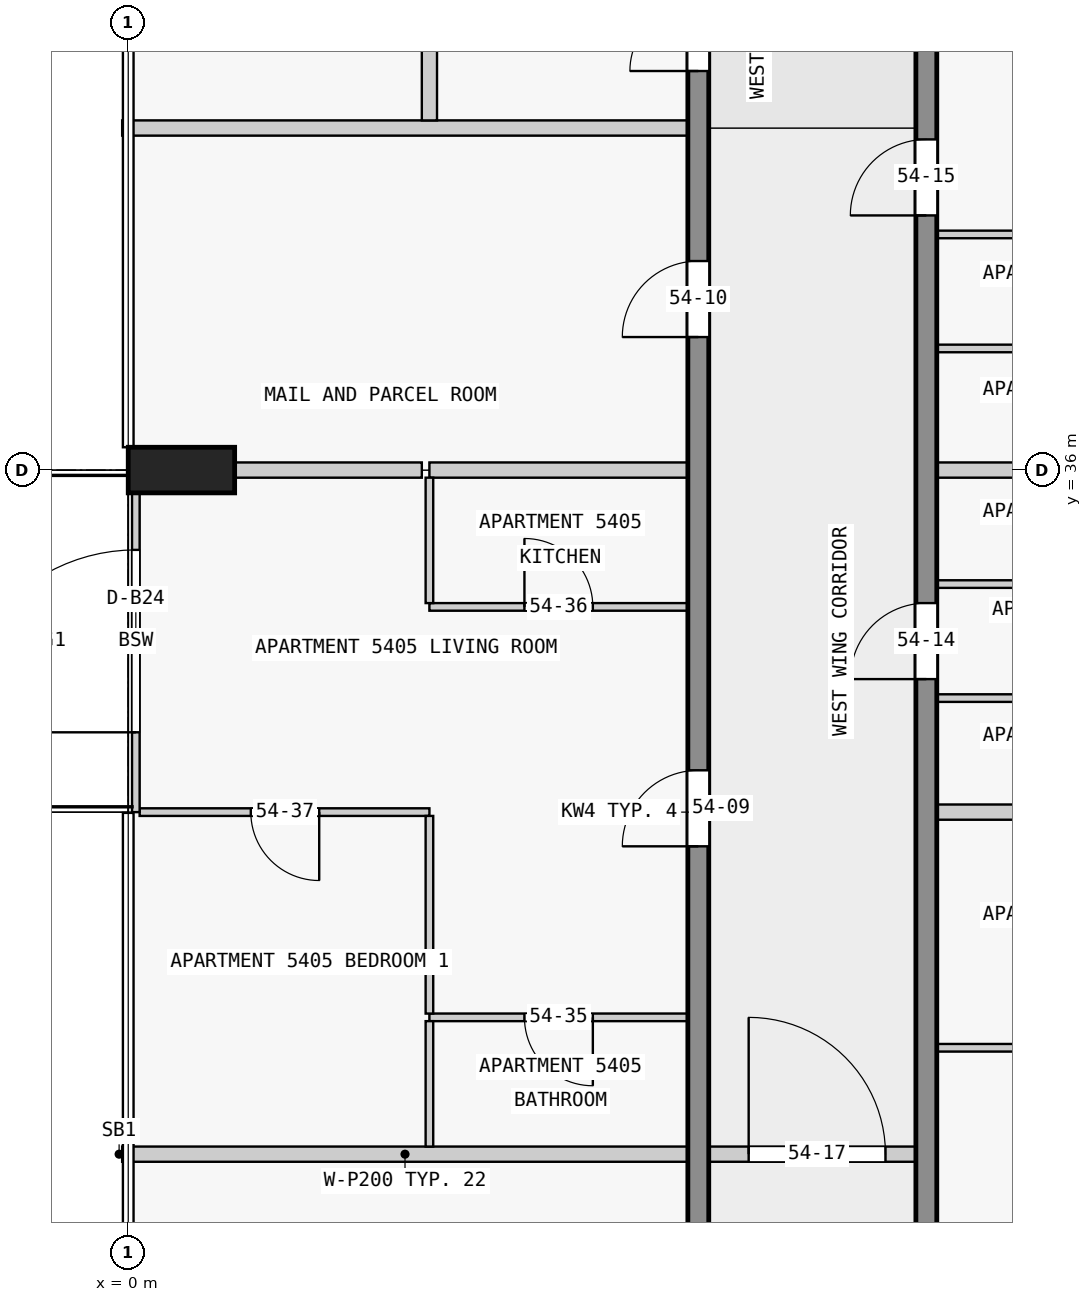
"""IFC4 building model, lengths in metres.
Left out: names, types, materials, properties, quantities, classifications, styles, units other than length and angle.
Written with IfcOpenShell. Run it as: python <this file> out.ifc"""

import sys

from ifc_helpers import new_model, si_unit, direction, frame, frame_2d, origin, origin_2d, place, context, subcontext, project, spatial, rectangle, extrude, element, fill, save


model = new_model("IFC4")
c1 = context("Model", 3, precision=1e-05, world=origin(), true_north=direction((0.0, 1.0)))
c2 = subcontext(c1, "Body", "Model", "MODEL_VIEW")
j1 = project(units=[si_unit("LENGTHUNIT", "METRE"), si_unit("PLANEANGLEUNIT", "RADIAN")], contexts=[c1])
p1 = place(None, origin())
s1 = spatial("IfcSite", under=j1, at=p1, CompositionType="ELEMENT")
p2 = place(p1, origin())
s2 = spatial("IfcBuilding", under=s1, at=p2, CompositionType="ELEMENT")
p3 = place(p2, frame((0.0, 0.0, 208.4)))
s3 = spatial("IfcBuildingStorey", under=s2, at=p3, CompositionType="ELEMENT", Elevation=208.4)
p4 = place(p3, frame((0.7, 36.0, 0.0), z_axis=(0.0, 0.0, 1.0), x_axis=(0.0, 1.0, 0.0)))
e1 = element("IfcColumn", 1, at=p4, inside=s3, PredefinedType="COLUMN", context=c2, shape_type="SweptSolid", body=[
    extrude(rectangle(XDim=0.6, YDim=1.4, at=origin_2d()), origin(), (0.0, 0.0, 1.0), 3.5),
])
p5 = place(p3, frame((7.5, 18.0, 0.0), z_axis=(0.0, 0.0, 1.0), x_axis=(0.0, 1.0, 0.0)))
e2 = element("IfcWall", 2, at=p5, inside=s3, PredefinedType="SHEAR", context=c2, shape_type="SweptSolid", body=[
    extrude(rectangle(XDim=27.0, YDim=0.275, at=frame_2d((13.5, 0.0))), origin(), (0.0, 0.0, 1.0), 3.25),
])
p6 = place(p5, frame((1.75, 0.0, 0.0)))
e3 = element("IfcOpeningElement", 3, at=p6, cuts=e2, PredefinedType="OPENING", context=c2, shape_type="SweptSolid", body=[
    extrude(rectangle(XDim=1.0, YDim=2.1, at=frame_2d((0.5, 1.05))), frame((0.0, 0.147, 0.0), z_axis=(0.0, -1.0, 0.0), x_axis=(1.0, 0.0, 0.0)), (0.0, 0.0, 1.0), 0.295),
])
p7 = place(p5, frame((5.85, 0.0, 0.0)))
e4 = element("IfcOpeningElement", 4, at=p7, cuts=e2, PredefinedType="OPENING", context=c2, shape_type="SweptSolid", body=[
    extrude(rectangle(XDim=1.8, YDim=2.1, at=frame_2d((0.9, 1.05))), frame((0.0, 0.147, 0.0), z_axis=(0.0, -1.0, 0.0), x_axis=(1.0, 0.0, 0.0)), (0.0, 0.0, 1.0), 0.295),
])
p8 = place(p5, frame((13.05, 0.0, 0.0)))
e5 = element("IfcOpeningElement", 5, at=p8, cuts=e2, PredefinedType="OPENING", context=c2, shape_type="SweptSolid", body=[
    extrude(rectangle(XDim=1.0, YDim=2.1, at=frame_2d((0.5, 1.05))), frame((0.0, 0.147, 0.0), z_axis=(0.0, -1.0, 0.0), x_axis=(1.0, 0.0, 0.0)), (0.0, 0.0, 1.0), 0.295),
])
p9 = place(p5, frame((19.75, 0.0, 0.0)))
e6 = element("IfcOpeningElement", 6, at=p9, cuts=e2, PredefinedType="OPENING", context=c2, shape_type="SweptSolid", body=[
    extrude(rectangle(XDim=1.0, YDim=2.1, at=frame_2d((0.5, 1.05))), frame((0.0, 0.147, 0.0), z_axis=(0.0, -1.0, 0.0), x_axis=(1.0, 0.0, 0.0)), (0.0, 0.0, 1.0), 0.295),
])
p10 = place(p5, frame((23.25, 0.0, 0.0)))
e7 = element("IfcOpeningElement", 7, at=p10, cuts=e2, PredefinedType="OPENING", context=c2, shape_type="SweptSolid", body=[
    extrude(rectangle(XDim=0.9, YDim=2.1, at=frame_2d((0.45, 1.05))), frame((0.0, 0.147, 0.0), z_axis=(0.0, -1.0, 0.0), x_axis=(1.0, 0.0, 0.0)), (0.0, 0.0, 1.0), 0.295),
])
p11 = place(p5, frame((25.45, 0.0, 0.0)))
e8 = element("IfcOpeningElement", 8, at=p11, cuts=e2, PredefinedType="OPENING", context=c2, shape_type="SweptSolid", body=[
    extrude(rectangle(XDim=1.0, YDim=2.1, at=frame_2d((0.5, 1.05))), frame((0.0, 0.147, 0.0), z_axis=(0.0, -1.0, 0.0), x_axis=(1.0, 0.0, 0.0)), (0.0, 0.0, 1.0), 0.295),
])
p12 = place(p3, frame((10.5, 18.0, 0.0), z_axis=(0.0, 0.0, 1.0), x_axis=(0.0, 1.0, 0.0)))
e9 = element("IfcWall", 9, at=p12, inside=s3, PredefinedType="SHEAR", context=c2, shape_type="SweptSolid", body=[
    extrude(rectangle(XDim=27.0, YDim=0.275, at=frame_2d((13.5, 0.0))), origin(), (0.0, 0.0, 1.0), 3.25),
])
p13 = place(p12, frame((4.85, 0.0, 0.0)))
e10 = element("IfcOpeningElement", 10, at=p13, cuts=e9, PredefinedType="OPENING", context=c2, shape_type="SweptSolid", body=[
    extrude(rectangle(XDim=1.0, YDim=2.1, at=frame_2d((0.5, 1.05))), frame((0.0, 0.147, 0.0), z_axis=(0.0, -1.0, 0.0), x_axis=(1.0, 0.0, 0.0)), (0.0, 0.0, 1.0), 0.295),
])
p14 = place(p12, frame((15.25, 0.0, 0.0)))
e11 = element("IfcOpeningElement", 11, at=p14, cuts=e9, PredefinedType="OPENING", context=c2, shape_type="SweptSolid", body=[
    extrude(rectangle(XDim=1.0, YDim=2.1, at=frame_2d((0.5, 1.05))), frame((0.0, 0.147, 0.0), z_axis=(0.0, -1.0, 0.0), x_axis=(1.0, 0.0, 0.0)), (0.0, 0.0, 1.0), 0.295),
])
p15 = place(p12, frame((21.35, 0.0, 0.0)))
e12 = element("IfcOpeningElement", 12, at=p15, cuts=e9, PredefinedType="OPENING", context=c2, shape_type="SweptSolid", body=[
    extrude(rectangle(XDim=1.0, YDim=2.1, at=frame_2d((0.5, 1.05))), frame((0.0, 0.147, 0.0), z_axis=(0.0, -1.0, 0.0), x_axis=(1.0, 0.0, 0.0)), (0.0, 0.0, 1.0), 0.295),
])
p16 = place(p3, frame((0.1, 31.5, 0.0), z_axis=(0.0, 0.0, 1.0), x_axis=(0.0, 1.0, 0.0)))
e13 = element("IfcWall", 13, at=p16, inside=s3, PredefinedType="STANDARD", context=c2, shape_type="SweptSolid", body=[
    extrude(rectangle(XDim=4.5, YDim=0.1, at=frame_2d((2.25, 0.0))), origin(), (0.0, 0.0, 1.0), 3.25),
])
p17 = place(p16, frame((1.05, 0.0, 0.0)))
e14 = element("IfcOpeningElement", 14, at=p17, cuts=e13, PredefinedType="OPENING", context=c2, shape_type="SweptSolid", body=[
    extrude(rectangle(XDim=2.4, YDim=2.4, at=frame_2d((1.2, 1.2))), frame((0.0, 0.06, 0.0), z_axis=(0.0, -1.0, 0.0), x_axis=(1.0, 0.0, 0.0)), (0.0, 0.0, 1.0), 0.12),
])
p18 = place(p3, frame((7.363, 27.0, 0.0), z_axis=(0.0, 0.0, 1.0), x_axis=(-1.0, 0.0, 0.0)))
e15 = element("IfcWall", 15, at=p18, inside=s3, PredefinedType="PARTITIONING", context=c2, shape_type="SweptSolid", body=[
    extrude(rectangle(XDim=7.443, YDim=0.2, at=frame_2d((3.721, 0.0))), origin(), (0.0, 0.0, 1.0), 3.25),
])
p19 = place(p3, frame((10.637, 28.4, 0.0), z_axis=(0.0, 0.0, 1.0), x_axis=(1.0, 0.0, 0.0)))
e16 = element("IfcWall", 16, at=p19, inside=s3, PredefinedType="PARTITIONING", context=c2, shape_type="SweptSolid", body=[
    extrude(rectangle(XDim=3.35, YDim=0.1, at=frame_2d((1.675, 0.0))), origin(), (0.0, 0.0, 1.0), 3.25),
])
p20 = place(p19, frame((1.25, 0.0, 0.0)))
e17 = element("IfcOpeningElement", 17, at=p20, cuts=e16, PredefinedType="OPENING", context=c2, shape_type="SweptSolid", body=[
    extrude(rectangle(XDim=0.9, YDim=2.1, at=frame_2d((0.45, 1.05))), frame((0.0, 0.06, 0.0), z_axis=(0.0, -1.0, 0.0), x_axis=(1.0, 0.0, 0.0)), (0.0, 0.0, 1.0), 0.12),
])
p21 = place(p3, frame((7.363, 28.8, 0.0), z_axis=(0.0, 0.0, 1.0), x_axis=(-1.0, 0.0, 0.0)))
e18 = element("IfcWall", 18, at=p21, inside=s3, PredefinedType="PARTITIONING", context=c2, shape_type="SweptSolid", body=[
    extrude(rectangle(XDim=3.4, YDim=0.1, at=frame_2d((1.7, 0.0))), origin(), (0.0, 0.0, 1.0), 3.25),
])
p22 = place(p21, frame((1.25, 0.0, 0.0)))
e19 = element("IfcOpeningElement", 19, at=p22, cuts=e18, PredefinedType="OPENING", context=c2, shape_type="SweptSolid", body=[
    extrude(rectangle(XDim=0.9, YDim=2.1, at=frame_2d((0.45, 1.05))), frame((0.0, 0.06, 0.0), z_axis=(0.0, -1.0, 0.0), x_axis=(1.0, 0.0, 0.0)), (0.0, 0.0, 1.0), 0.12),
])
p23 = place(p3, frame((3.962, 31.5, 0.0), z_axis=(0.0, 0.0, 1.0), x_axis=(-1.0, 0.0, 0.0)))
e20 = element("IfcWall", 20, at=p23, inside=s3, PredefinedType="PARTITIONING", context=c2, shape_type="SweptSolid", body=[
    extrude(rectangle(XDim=3.812, YDim=0.1, at=frame_2d((1.906, 0.0))), origin(), (0.0, 0.0, 1.0), 3.25),
])
p24 = place(p23, frame((1.45, 0.0, 0.0)))
e21 = element("IfcOpeningElement", 21, at=p24, cuts=e20, PredefinedType="OPENING", context=c2, shape_type="SweptSolid", body=[
    extrude(rectangle(XDim=0.9, YDim=2.1, at=frame_2d((0.45, 1.05))), frame((0.0, 0.06, 0.0), z_axis=(0.0, -1.0, 0.0), x_axis=(1.0, 0.0, 0.0)), (0.0, 0.0, 1.0), 0.12),
])
p25 = place(p3, frame((17.85, 31.5, 0.0), z_axis=(0.0, 0.0, 1.0), x_axis=(-1.0, 0.0, 0.0)))
e22 = element("IfcWall", 22, at=p25, inside=s3, PredefinedType="PARTITIONING", context=c2, shape_type="SweptSolid", body=[
    extrude(rectangle(XDim=7.213, YDim=0.2, at=frame_2d((3.606, 0.0))), origin(), (0.0, 0.0, 1.0), 3.25),
])
p26 = place(p3, frame((13.988, 33.0, 0.0), z_axis=(0.0, 0.0, 1.0), x_axis=(-1.0, 0.0, 0.0)))
e23 = element("IfcWall", 23, at=p26, inside=s3, PredefinedType="PARTITIONING", context=c2, shape_type="SweptSolid", body=[
    extrude(rectangle(XDim=3.35, YDim=0.1, at=frame_2d((1.675, 0.0))), origin(), (0.0, 0.0, 1.0), 3.25),
])
p27 = place(p26, frame((1.25, 0.0, 0.0)))
e24 = element("IfcOpeningElement", 24, at=p27, cuts=e23, PredefinedType="OPENING", context=c2, shape_type="SweptSolid", body=[
    extrude(rectangle(XDim=0.9, YDim=2.1, at=frame_2d((0.45, 1.05))), frame((0.0, 0.06, 0.0), z_axis=(0.0, -1.0, 0.0), x_axis=(1.0, 0.0, 0.0)), (0.0, 0.0, 1.0), 0.12),
])
p28 = place(p3, frame((3.962, 34.2, 0.0), z_axis=(0.0, 0.0, 1.0), x_axis=(1.0, 0.0, 0.0)))
e25 = element("IfcWall", 25, at=p28, inside=s3, PredefinedType="PARTITIONING", context=c2, shape_type="SweptSolid", body=[
    extrude(rectangle(XDim=3.4, YDim=0.1, at=frame_2d((1.7, 0.0))), origin(), (0.0, 0.0, 1.0), 3.25),
])
p29 = place(p28, frame((1.25, 0.0, 0.0)))
e26 = element("IfcOpeningElement", 26, at=p29, cuts=e25, PredefinedType="OPENING", context=c2, shape_type="SweptSolid", body=[
    extrude(rectangle(XDim=0.9, YDim=2.1, at=frame_2d((0.45, 1.05))), frame((0.0, 0.06, 0.0), z_axis=(0.0, -1.0, 0.0), x_axis=(1.0, 0.0, 0.0)), (0.0, 0.0, 1.0), 0.12),
])
p30 = place(p3, frame((10.637, 34.5, 0.0), z_axis=(0.0, 0.0, 1.0), x_axis=(1.0, 0.0, 0.0)))
e27 = element("IfcWall", 27, at=p30, inside=s3, PredefinedType="PARTITIONING", context=c2, shape_type="SweptSolid", body=[
    extrude(rectangle(XDim=3.35, YDim=0.1, at=frame_2d((1.675, 0.0))), origin(), (0.0, 0.0, 1.0), 3.25),
])
p31 = place(p30, frame((1.25, 0.0, 0.0)))
e28 = element("IfcOpeningElement", 28, at=p31, cuts=e27, PredefinedType="OPENING", context=c2, shape_type="SweptSolid", body=[
    extrude(rectangle(XDim=0.9, YDim=2.1, at=frame_2d((0.45, 1.05))), frame((0.0, 0.06, 0.0), z_axis=(0.0, -1.0, 0.0), x_axis=(1.0, 0.0, 0.0)), (0.0, 0.0, 1.0), 0.12),
])
for number, where, z_axis, x_axis in (
    (29, (7.363, 36.0, 0.0), (0.0, 0.0, 1.0), (-1.0, 0.0, 0.0)),
    (30, (14.038, 36.0, 0.0), (0.0, 0.0, 1.0), (-1.0, 0.0, 0.0)),
):
    element("IfcWall", number, at=place(p3, frame(where, z_axis=z_axis, x_axis=x_axis)), inside=s3, PredefinedType="PARTITIONING", context=c2, shape_type="SweptSolid", body=[
        extrude(rectangle(XDim=3.4, YDim=0.2, at=frame_2d((1.7, 0.0))), origin(), (0.0, 0.0, 1.0), 3.25),
    ])
p32 = place(p3, frame((1.4, 36.0, 0.0), z_axis=(0.0, 0.0, 1.0), x_axis=(1.0, 0.0, 0.0)))
e31 = element("IfcWall", 31, at=p32, inside=s3, PredefinedType="PARTITIONING", context=c2, shape_type="SweptSolid", body=[
    extrude(rectangle(XDim=2.463, YDim=0.2, at=frame_2d((1.231, 0.0))), origin(), (0.0, 0.0, 1.0), 3.25),
])
p33 = place(p3, frame((13.988, 37.6, 0.0), z_axis=(0.0, 0.0, 1.0), x_axis=(-1.0, 0.0, 0.0)))
e32 = element("IfcWall", 32, at=p33, inside=s3, PredefinedType="PARTITIONING", context=c2, shape_type="SweptSolid", body=[
    extrude(rectangle(XDim=3.35, YDim=0.1, at=frame_2d((1.675, 0.0))), origin(), (0.0, 0.0, 1.0), 3.25),
])
p34 = place(p3, frame((13.988, 39.1, 0.0), z_axis=(0.0, 0.0, 1.0), x_axis=(-1.0, 0.0, 0.0)))
e33 = element("IfcWall", 33, at=p34, inside=s3, PredefinedType="PARTITIONING", context=c2, shape_type="SweptSolid", body=[
    extrude(rectangle(XDim=3.35, YDim=0.1, at=frame_2d((1.675, 0.0))), origin(), (0.0, 0.0, 1.0), 3.25),
])
p35 = place(p34, frame((1.25, 0.0, 0.0)))
e34 = element("IfcOpeningElement", 34, at=p35, cuts=e33, PredefinedType="OPENING", context=c2, shape_type="SweptSolid", body=[
    extrude(rectangle(XDim=0.9, YDim=2.1, at=frame_2d((0.45, 1.05))), frame((0.0, 0.06, 0.0), z_axis=(0.0, -1.0, 0.0), x_axis=(1.0, 0.0, 0.0)), (0.0, 0.0, 1.0), 0.12),
])
p36 = place(p3, frame((7.363, 40.5, 0.0), z_axis=(0.0, 0.0, 1.0), x_axis=(-1.0, 0.0, 0.0)))
e35 = element("IfcWall", 35, at=p36, inside=s3, PredefinedType="PARTITIONING", context=c2, shape_type="SweptSolid", body=[
    extrude(rectangle(XDim=7.443, YDim=0.2, at=frame_2d((3.721, 0.0))), origin(), (0.0, 0.0, 1.0), 3.25),
])
for number, where, z_axis, x_axis in (
    (36, (3.962, 28.75, 0.0), (0.0, 0.0, 1.0), (0.0, -1.0, 0.0)),
    (37, (3.962, 35.9, 0.0), (0.0, 0.0, 1.0), (0.0, -1.0, 0.0)),
):
    element("IfcWall", number, at=place(p3, frame(where, z_axis=z_axis, x_axis=x_axis)), inside=s3, PredefinedType="PARTITIONING", context=c2, shape_type="SweptSolid", body=[
        extrude(rectangle(XDim=1.65, YDim=0.1, at=frame_2d((0.825, 0.0))), origin(), (0.0, 0.0, 1.0), 3.25),
    ])
p37 = place(p3, frame((3.962, 28.85, 0.0), z_axis=(0.0, 0.0, 1.0), x_axis=(0.0, 1.0, 0.0)))
e38 = element("IfcWall", 38, at=p37, inside=s3, PredefinedType="PARTITIONING", context=c2, shape_type="SweptSolid", body=[
    extrude(rectangle(XDim=2.6, YDim=0.1, at=frame_2d((1.3, 0.0))), origin(), (0.0, 0.0, 1.0), 3.25),
])
p38 = place(p3, frame((3.962, 42.8, 0.0), z_axis=(0.0, 0.0, 1.0), x_axis=(0.0, -1.0, 0.0)))
e39 = element("IfcWall", 39, at=p38, inside=s3, PredefinedType="PARTITIONING", context=c2, shape_type="SweptSolid", body=[
    extrude(rectangle(XDim=2.2, YDim=0.2, at=frame_2d((1.1, 0.0))), origin(), (0.0, 0.0, 1.0), 3.25),
])
p39 = place(p3, frame((7.462, 27.0, 0.0), z_axis=(0.0, 0.0, 1.0), x_axis=(1.0, 0.0, 0.0)))
e40 = element("IfcWall", 40, at=p39, inside=s3, PredefinedType="PARTITIONING", context=c2, shape_type="SweptSolid", body=[
    extrude(rectangle(XDim=3.175, YDim=0.2, at=frame_2d((1.587, 0.0))), origin(), (0.0, 0.0, 1.0), 3.25),
])
p40 = place(p39, frame((0.7, 0.0, 0.0)))
e41 = element("IfcOpeningElement", 41, at=p40, cuts=e40, PredefinedType="OPENING", context=c2, shape_type="SweptSolid", body=[
    extrude(rectangle(XDim=1.8, YDim=2.1, at=frame_2d((0.9, 1.05))), frame((0.0, 0.11, 0.0), z_axis=(0.0, -1.0, 0.0), x_axis=(1.0, 0.0, 0.0)), (0.0, 0.0, 1.0), 0.22),
])
p41 = place(p17, origin())
e42 = element("IfcDoor", 42, at=p41, inside=s3, OperationType="SINGLE_SWING_LEFT", PredefinedType="DOOR", context=c2, shape_type="SweptSolid", body=[
    extrude(rectangle(XDim=2.4, YDim=2.4, at=frame_2d((1.2, 1.2))), frame((0.0, 0.025, 0.0), z_axis=(0.0, -1.0, 0.0), x_axis=(1.0, 0.0, 0.0)), (0.0, 0.0, 1.0), 0.05),
])
fill(e14, e42)
p42 = place(p8, origin())
e43 = element("IfcDoor", 43, at=p42, inside=s3, OperationType="SINGLE_SWING_RIGHT", PredefinedType="DOOR", context=c2, shape_type="SweptSolid", body=[
    extrude(rectangle(XDim=1.0, YDim=2.1, at=frame_2d((0.5, 1.05))), frame((0.0, 0.025, 0.0), z_axis=(0.0, -1.0, 0.0), x_axis=(1.0, 0.0, 0.0)), (0.0, 0.0, 1.0), 0.05),
])
fill(e5, e43)
p43 = place(p9, origin())
e44 = element("IfcDoor", 44, at=p43, inside=s3, OperationType="SINGLE_SWING_RIGHT", PredefinedType="DOOR", context=c2, shape_type="SweptSolid", body=[
    extrude(rectangle(XDim=1.0, YDim=2.1, at=frame_2d((0.5, 1.05))), frame((0.0, 0.025, 0.0), z_axis=(0.0, -1.0, 0.0), x_axis=(1.0, 0.0, 0.0)), (0.0, 0.0, 1.0), 0.05),
])
fill(e6, e44)
p44 = place(p10, origin())
e45 = element("IfcDoor", 45, at=p44, inside=s3, OperationType="SINGLE_SWING_RIGHT", PredefinedType="DOOR", context=c2, shape_type="SweptSolid", body=[
    extrude(rectangle(XDim=0.9, YDim=2.1, at=frame_2d((0.45, 1.05))), frame((0.0, 0.025, 0.0), z_axis=(0.0, -1.0, 0.0), x_axis=(1.0, 0.0, 0.0)), (0.0, 0.0, 1.0), 0.05),
])
fill(e7, e45)
p45 = place(p14, origin())
e46 = element("IfcDoor", 46, at=p45, inside=s3, OperationType="SINGLE_SWING_RIGHT", PredefinedType="DOOR", context=c2, shape_type="SweptSolid", body=[
    extrude(rectangle(XDim=1.0, YDim=2.1, at=frame_2d((0.5, 1.05))), frame((0.0, 0.025, 0.0), z_axis=(0.0, -1.0, 0.0), x_axis=(1.0, 0.0, 0.0)), (0.0, 0.0, 1.0), 0.05),
])
fill(e11, e46)
p46 = place(p15, origin())
e47 = element("IfcDoor", 47, at=p46, inside=s3, OperationType="SINGLE_SWING_RIGHT", PredefinedType="DOOR", context=c2, shape_type="SweptSolid", body=[
    extrude(rectangle(XDim=1.0, YDim=2.1, at=frame_2d((0.5, 1.05))), frame((0.0, 0.025, 0.0), z_axis=(0.0, -1.0, 0.0), x_axis=(1.0, 0.0, 0.0)), (0.0, 0.0, 1.0), 0.05),
])
fill(e12, e47)
p47 = place(p40, origin())
e48 = element("IfcDoor", 48, at=p47, inside=s3, OperationType="SINGLE_SWING_RIGHT", PredefinedType="DOOR", context=c2, shape_type="SweptSolid", body=[
    extrude(rectangle(XDim=1.8, YDim=2.1, at=frame_2d((0.9, 1.05))), frame((0.0, 0.025, 0.0), z_axis=(0.0, -1.0, 0.0), x_axis=(1.0, 0.0, 0.0)), (0.0, 0.0, 1.0), 0.05),
])
fill(e41, e48)
p48 = place(p22, origin())
e49 = element("IfcDoor", 49, at=p48, inside=s3, OperationType="SINGLE_SWING_LEFT", PredefinedType="DOOR", context=c2, shape_type="SweptSolid", body=[
    extrude(rectangle(XDim=0.9, YDim=2.1, at=frame_2d((0.45, 1.05))), frame((0.0, 0.025, 0.0), z_axis=(0.0, -1.0, 0.0), x_axis=(1.0, 0.0, 0.0)), (0.0, 0.0, 1.0), 0.05),
])
fill(e19, e49)
p49 = place(p29, origin())
e50 = element("IfcDoor", 50, at=p49, inside=s3, OperationType="SINGLE_SWING_LEFT", PredefinedType="DOOR", context=c2, shape_type="SweptSolid", body=[
    extrude(rectangle(XDim=0.9, YDim=2.1, at=frame_2d((0.45, 1.05))), frame((0.0, 0.025, 0.0), z_axis=(0.0, -1.0, 0.0), x_axis=(1.0, 0.0, 0.0)), (0.0, 0.0, 1.0), 0.05),
])
fill(e26, e50)
p50 = place(p24, origin())
e51 = element("IfcDoor", 51, at=p50, inside=s3, OperationType="SINGLE_SWING_LEFT", PredefinedType="DOOR", context=c2, shape_type="SweptSolid", body=[
    extrude(rectangle(XDim=0.9, YDim=2.1, at=frame_2d((0.45, 1.05))), frame((0.0, 0.025, 0.0), z_axis=(0.0, -1.0, 0.0), x_axis=(1.0, 0.0, 0.0)), (0.0, 0.0, 1.0), 0.05),
])
fill(e21, e51)
save(model, sys.argv[1])
